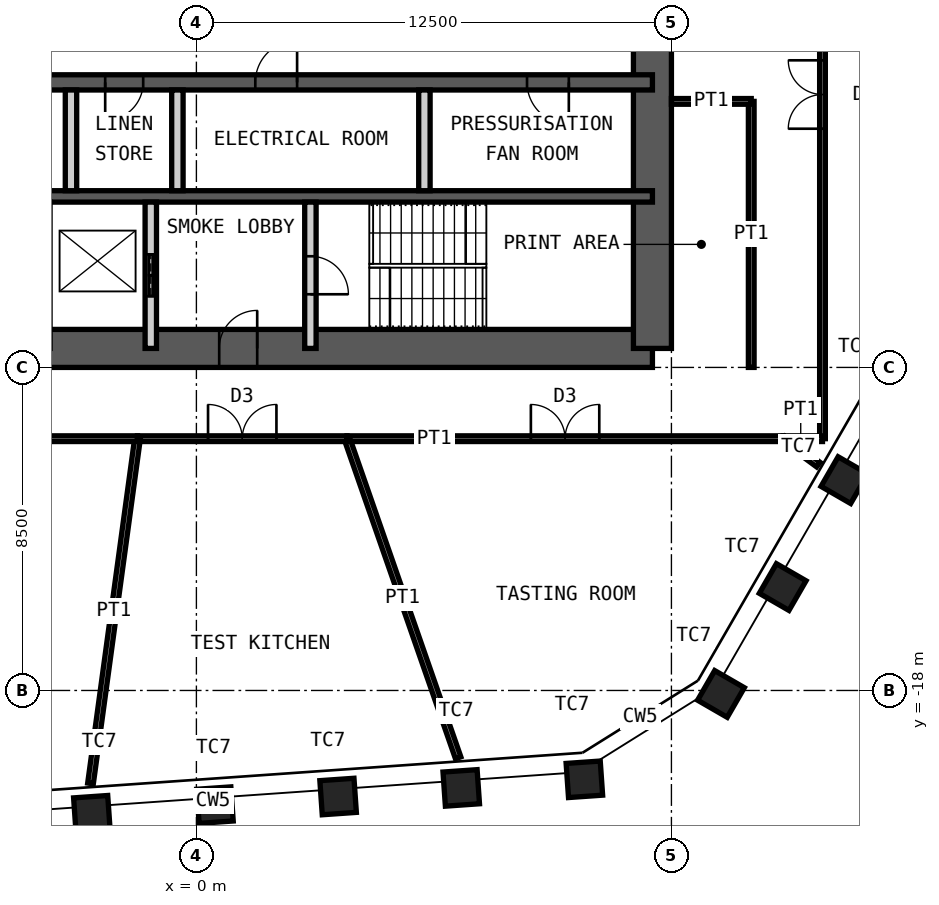
"""IFC4 building model, lengths in metres.
Left out: names, types, materials, properties, quantities, classifications, styles, units other than length and angle.
Written with IfcOpenShell. Run it as: python <this file> out.ifc"""

import sys

from ifc_helpers import new_model, si_unit, direction, frame, frame_2d, origin, origin_2d, place, context, subcontext, project, spatial, rectangle, hollow_rectangle, extrude, element, fill, save


model = new_model("IFC4")
c1 = context("Model", 3, precision=1e-05, world=origin(), true_north=direction((0.0, 1.0)))
c2 = subcontext(c1, "Body", "Model", "MODEL_VIEW")
j1 = project(units=[si_unit("LENGTHUNIT", "METRE"), si_unit("PLANEANGLEUNIT", "RADIAN")], contexts=[c1])
p1 = place(None, origin())
s1 = spatial("IfcSite", under=j1, at=p1, CompositionType="ELEMENT")
p2 = place(p1, origin())
s2 = spatial("IfcBuilding", under=s1, at=p2, CompositionType="ELEMENT")
p3 = place(p2, frame((0.0, 0.0, 287.2)))
s3 = spatial("IfcBuildingStorey", under=s2, at=p3, CompositionType="ELEMENT", Elevation=287.2)
for number, where, z_axis, x_axis in (
    (1, (17.052, -12.466, 0.0), (0.0, 0.0, 1.0), (0.5, 0.866, 0.0)),
    (2, (15.427, -15.279, 0.0), (0.0, 0.0, 1.0), (0.5, 0.866, 0.0)),
    (3, (13.803, -18.092, 0.0), (0.0, 0.0, 1.0), (0.5, 0.866, 0.0)),
    (4, (10.209, -20.337, 0.0), (0.0, 0.0, 1.0), (0.998, 0.07, 0.0)),
    (5, (6.969, -20.564, 0.0), (0.0, 0.0, 1.0), (0.998, 0.07, 0.0)),
    (6, (3.729, -20.791, 0.0), (0.0, 0.0, 1.0), (0.998, 0.07, 0.0)),
    (7, (0.489, -21.017, 0.0), (0.0, 0.0, 1.0), (0.998, 0.07, 0.0)),
    (8, (-2.751, -21.244, 0.0), (0.0, 0.0, 1.0), (0.998, 0.07, 0.0)),
):
    element("IfcColumn", number, at=place(p3, frame(where, z_axis=z_axis, x_axis=x_axis)), inside=s3, PredefinedType="COLUMN", context=c2, shape_type="SweptSolid", body=[
        extrude(hollow_rectangle(XDim=0.9, YDim=0.9, WallThickness=0.06, at=origin_2d()), origin(), (0.0, 0.0, 1.0), 4.2),
    ])
p4 = place(p3, frame((-12.0, -9.0, 0.0), z_axis=(0.0, 0.0, 1.0), x_axis=(1.0, 0.0, 0.0)))
e9 = element("IfcWall", 9, at=p4, inside=s3, PredefinedType="SHEAR", context=c2, shape_type="SweptSolid", body=[
    extrude(rectangle(XDim=24.0, YDim=1.0, at=frame_2d((12.0, 0.0))), origin(), (0.0, 0.0, 1.0), 4.2),
])
p5 = place(p4, frame((1.35, 0.0, 0.0)))
e10 = element("IfcOpeningElement", 10, at=p5, cuts=e9, PredefinedType="OPENING", context=c2, shape_type="SweptSolid", body=[
    extrude(rectangle(XDim=1.0, YDim=2.1, at=frame_2d((0.5, 1.05))), frame((0.0, 0.51, 0.0), z_axis=(0.0, -1.0, 0.0), x_axis=(1.0, 0.0, 0.0)), (0.0, 0.0, 1.0), 1.02),
])
p6 = place(p4, frame((5.325, 0.0, 0.0)))
e11 = element("IfcOpeningElement", 11, at=p6, cuts=e9, PredefinedType="OPENING", context=c2, shape_type="SweptSolid", body=[
    extrude(rectangle(XDim=1.15, YDim=2.1, at=frame_2d((0.575, 1.05))), frame((0.0, 0.51, 0.0), z_axis=(0.0, -1.0, 0.0), x_axis=(1.0, 0.0, 0.0)), (0.0, 0.0, 1.0), 1.02),
])
p7 = place(p4, frame((12.6, 0.0, 0.0)))
e12 = element("IfcOpeningElement", 12, at=p7, cuts=e9, PredefinedType="OPENING", context=c2, shape_type="SweptSolid", body=[
    extrude(rectangle(XDim=1.0, YDim=2.1, at=frame_2d((0.5, 1.05))), frame((0.0, 0.51, 0.0), z_axis=(0.0, -1.0, 0.0), x_axis=(1.0, 0.0, 0.0)), (0.0, 0.0, 1.0), 1.02),
])
p8 = place(p3, frame((12.0, -9.0, 0.0), z_axis=(0.0, 0.0, 1.0), x_axis=(0.0, 1.0, 0.0)))
e13 = element("IfcWall", 13, at=p8, inside=s3, PredefinedType="SHEAR", context=c2, shape_type="SweptSolid", body=[
    extrude(rectangle(XDim=18.0, YDim=1.0, at=frame_2d((9.0, 0.0))), origin(), (0.0, 0.0, 1.0), 4.2),
])
p9 = place(p8, frame((8.1, 0.0, 0.0)))
e14 = element("IfcOpeningElement", 14, at=p9, cuts=e13, PredefinedType="OPENING", context=c2, shape_type="SweptSolid", body=[
    extrude(rectangle(XDim=1.8, YDim=2.1, at=frame_2d((0.9, 1.05))), frame((0.0, 0.51, 0.0), z_axis=(0.0, -1.0, 0.0), x_axis=(1.0, 0.0, 0.0)), (0.0, 0.0, 1.0), 1.02),
])
p10 = place(p3, frame((-12.0, -2.0, 0.0), z_axis=(0.0, 0.0, 1.0), x_axis=(1.0, 0.0, 0.0)))
e15 = element("IfcWall", 15, at=p10, inside=s3, PredefinedType="SHEAR", context=c2, shape_type="SweptSolid", body=[
    extrude(rectangle(XDim=24.0, YDim=0.4, at=frame_2d((12.0, 0.0))), origin(), (0.0, 0.0, 1.0), 4.2),
])
p11 = place(p10, frame((1.1, 0.0, 0.0)))
e16 = element("IfcOpeningElement", 16, at=p11, cuts=e15, PredefinedType="OPENING", context=c2, shape_type="SweptSolid", body=[
    extrude(rectangle(XDim=1.1, YDim=2.1, at=frame_2d((0.55, 1.05))), frame((0.0, 0.21, 0.0), z_axis=(0.0, -1.0, 0.0), x_axis=(1.0, 0.0, 0.0)), (0.0, 0.0, 1.0), 0.42),
])
p12 = place(p10, frame((13.55, 0.0, 0.0)))
e17 = element("IfcOpeningElement", 17, at=p12, cuts=e15, PredefinedType="OPENING", context=c2, shape_type="SweptSolid", body=[
    extrude(rectangle(XDim=1.1, YDim=2.1, at=frame_2d((0.55, 1.05))), frame((0.0, 0.21, 0.0), z_axis=(0.0, -1.0, 0.0), x_axis=(1.0, 0.0, 0.0)), (0.0, 0.0, 1.0), 0.42),
])
p13 = place(p10, frame((20.7, 0.0, 0.0)))
e18 = element("IfcOpeningElement", 18, at=p13, cuts=e15, PredefinedType="OPENING", context=c2, shape_type="SweptSolid", body=[
    extrude(rectangle(XDim=1.1, YDim=2.1, at=frame_2d((0.55, 1.05))), frame((0.0, 0.21, 0.0), z_axis=(0.0, -1.0, 0.0), x_axis=(1.0, 0.0, 0.0)), (0.0, 0.0, 1.0), 0.42),
])
p14 = place(p10, frame((4.0, 0.0, 0.0)))
e19 = element("IfcOpeningElement", 19, at=p14, cuts=e15, PredefinedType="OPENING", context=c2, shape_type="SweptSolid", body=[
    extrude(rectangle(XDim=1.0, YDim=2.1, at=frame_2d((0.5, 1.05))), frame((0.0, 0.21, 0.0), z_axis=(0.0, -1.0, 0.0), x_axis=(1.0, 0.0, 0.0)), (0.0, 0.0, 1.0), 0.42),
])
p15 = place(p10, frame((6.8, 0.0, 0.0)))
e20 = element("IfcOpeningElement", 20, at=p15, cuts=e15, PredefinedType="OPENING", context=c2, shape_type="SweptSolid", body=[
    extrude(rectangle(XDim=1.0, YDim=2.1, at=frame_2d((0.5, 1.05))), frame((0.0, 0.21, 0.0), z_axis=(0.0, -1.0, 0.0), x_axis=(1.0, 0.0, 0.0)), (0.0, 0.0, 1.0), 0.42),
])
p16 = place(p10, frame((9.6, 0.0, 0.0)))
e21 = element("IfcOpeningElement", 21, at=p16, cuts=e15, PredefinedType="OPENING", context=c2, shape_type="SweptSolid", body=[
    extrude(rectangle(XDim=1.0, YDim=2.1, at=frame_2d((0.5, 1.05))), frame((0.0, 0.21, 0.0), z_axis=(0.0, -1.0, 0.0), x_axis=(1.0, 0.0, 0.0)), (0.0, 0.0, 1.0), 0.42),
])
p17 = place(p3, frame((-12.0, -5.0, 0.0), z_axis=(0.0, 0.0, 1.0), x_axis=(1.0, 0.0, 0.0)))
e22 = element("IfcWall", 22, at=p17, inside=s3, PredefinedType="SHEAR", context=c2, shape_type="SweptSolid", body=[
    extrude(rectangle(XDim=24.0, YDim=0.3, at=frame_2d((12.0, 0.0))), origin(), (0.0, 0.0, 1.0), 4.2),
])
for number, where, z_axis, x_axis in (
    (23, (-3.3, -4.85, 0.0), (0.0, 0.0, 1.0), (0.0, 1.0, 0.0)),
    (24, (-0.5, -4.85, 0.0), (0.0, 0.0, 1.0), (0.0, 1.0, 0.0)),
    (25, (6.0, -4.85, 0.0), (0.0, 0.0, 1.0), (0.0, 1.0, 0.0)),
):
    element("IfcWall", number, at=place(p3, frame(where, z_axis=z_axis, x_axis=x_axis)), inside=s3, PredefinedType="PARTITIONING", context=c2, shape_type="SweptSolid", body=[
        extrude(rectangle(XDim=2.65, YDim=0.3, at=frame_2d((1.325, 0.0))), origin(), (0.0, 0.0, 1.0), 3.98),
    ])
p18 = place(p3, frame((-1.2, -9.0, 0.0), z_axis=(0.0, 0.0, 1.0), x_axis=(0.0, 1.0, 0.0)))
e26 = element("IfcWall", 26, at=p18, inside=s3, PredefinedType="PARTITIONING", context=c2, shape_type="SweptSolid", body=[
    extrude(rectangle(XDim=3.85, YDim=0.3, at=frame_2d((1.925, 0.0))), origin(), (0.0, 0.0, 1.0), 3.98),
])
p19 = place(p18, frame((1.375, 0.0, 0.0)))
e27 = element("IfcOpeningElement", 27, at=p19, cuts=e26, PredefinedType="OPENING", context=c2, shape_type="SweptSolid", body=[
    extrude(rectangle(XDim=1.1, YDim=2.4, at=frame_2d((0.55, 1.2))), frame((0.0, 0.16, 0.0), z_axis=(0.0, -1.0, 0.0), x_axis=(1.0, 0.0, 0.0)), (0.0, 0.0, 1.0), 0.32),
])
p20 = place(p3, frame((3.0, -9.0, 0.0), z_axis=(0.0, 0.0, 1.0), x_axis=(0.0, 1.0, 0.0)))
e28 = element("IfcWall", 28, at=p20, inside=s3, PredefinedType="PARTITIONING", context=c2, shape_type="SweptSolid", body=[
    extrude(rectangle(XDim=3.85, YDim=0.3, at=frame_2d((1.925, 0.0))), origin(), (0.0, 0.0, 1.0), 3.98),
])
p21 = place(p20, frame((1.425, 0.0, 0.0)))
e29 = element("IfcOpeningElement", 29, at=p21, cuts=e28, PredefinedType="OPENING", context=c2, shape_type="SweptSolid", body=[
    extrude(rectangle(XDim=1.0, YDim=2.1, at=frame_2d((0.5, 1.05))), frame((0.0, 0.16, 0.0), z_axis=(0.0, -1.0, 0.0), x_axis=(1.0, 0.0, 0.0)), (0.0, 0.0, 1.0), 0.32),
])
p22 = place(p3, frame((16.475, 6.737, 0.0), z_axis=(0.0, 0.0, 1.0), x_axis=(0.0, -1.0, 0.0)))
e30 = element("IfcWall", 30, at=p22, inside=s3, PredefinedType="PARTITIONING", context=c2, shape_type="SweptSolid", body=[
    extrude(rectangle(XDim=18.112, YDim=0.15, at=frame_2d((9.056, 0.0))), origin(), (0.0, 0.0, 1.0), 4.03),
])
p23 = place(p22, frame((8.156, 0.0, 0.0)))
e31 = element("IfcOpeningElement", 31, at=p23, cuts=e30, PredefinedType="OPENING", context=c2, shape_type="SweptSolid", body=[
    extrude(rectangle(XDim=1.8, YDim=2.4, at=frame_2d((0.9, 1.2))), frame((0.0, 0.085, 0.0), z_axis=(0.0, -1.0, 0.0), x_axis=(1.0, 0.0, 0.0)), (0.0, 0.0, 1.0), 0.17),
])
p24 = place(p3, frame((16.475, -11.375, 0.0), z_axis=(0.0, 0.0, 1.0), x_axis=(-1.0, 0.0, 0.0)))
e32 = element("IfcWall", 32, at=p24, inside=s3, PredefinedType="PARTITIONING", context=c2, shape_type="SweptSolid", body=[
    extrude(rectangle(XDim=1.035, YDim=0.15, at=frame_2d((0.518, 0.0))), origin(), (0.0, 0.0, 1.0), 4.03),
])
p25 = place(p3, frame((16.365, -12.056, 0.0), z_axis=(0.0, 0.0, 1.0), x_axis=(-0.805146625055, 0.593075806421, 0.0)))
e33 = element("IfcWall", 33, at=p25, inside=s3, PredefinedType="PARTITIONING", context=c2, shape_type="SweptSolid", body=[
    extrude(rectangle(XDim=1.149, YDim=0.15, at=frame_2d((0.574, 0.0))), origin(), (0.0, 0.0, 1.0), 3.33),
])
p26 = place(p3, frame((15.44, -11.375, 0.0), z_axis=(0.0, 0.0, 1.0), x_axis=(-1.0, 0.0, 0.0)))
e34 = element("IfcWall", 34, at=p26, inside=s3, PredefinedType="PARTITIONING", context=c2, shape_type="SweptSolid", body=[
    extrude(rectangle(XDim=11.477, YDim=0.15, at=frame_2d((5.739, 0.0))), origin(), (0.0, 0.0, 1.0), 4.03),
])
p27 = place(p26, frame((4.839, 0.0, 0.0)))
e35 = element("IfcOpeningElement", 35, at=p27, cuts=e34, PredefinedType="OPENING", context=c2, shape_type="SweptSolid", body=[
    extrude(rectangle(XDim=1.8, YDim=2.4, at=frame_2d((0.9, 1.2))), frame((0.0, 0.085, 0.0), z_axis=(0.0, -1.0, 0.0), x_axis=(1.0, 0.0, 0.0)), (0.0, 0.0, 1.0), 0.17),
])
p28 = place(p3, frame((6.888, -19.771, 0.0), z_axis=(0.0, 0.0, 1.0), x_axis=(-0.328983865825, 0.944335542075, 0.0)))
e36 = element("IfcWall", 36, at=p28, inside=s3, PredefinedType="PARTITIONING", context=c2, shape_type="SweptSolid", body=[
    extrude(rectangle(XDim=8.891, YDim=0.15, at=frame_2d((4.446, 0.0))), origin(), (0.0, 0.0, 1.0), 3.33),
])
p29 = place(p3, frame((3.963, -11.375, 0.0), z_axis=(0.0, 0.0, 1.0), x_axis=(-1.0, 0.0, 0.0)))
e37 = element("IfcWall", 37, at=p29, inside=s3, PredefinedType="PARTITIONING", context=c2, shape_type="SweptSolid", body=[
    extrude(rectangle(XDim=5.513, YDim=0.15, at=frame_2d((2.756, 0.0))), origin(), (0.0, 0.0, 1.0), 4.03),
])
p30 = place(p29, frame((1.856, 0.0, 0.0)))
e38 = element("IfcOpeningElement", 38, at=p30, cuts=e37, PredefinedType="OPENING", context=c2, shape_type="SweptSolid", body=[
    extrude(rectangle(XDim=1.8, YDim=2.4, at=frame_2d((0.9, 1.2))), frame((0.0, 0.085, 0.0), z_axis=(0.0, -1.0, 0.0), x_axis=(1.0, 0.0, 0.0)), (0.0, 0.0, 1.0), 0.17),
])
p31 = place(p3, frame((-2.786, -20.446, 0.0), z_axis=(0.0, 0.0, 1.0), x_axis=(0.135041803834, 0.99083990191, 0.0)))
e39 = element("IfcWall", 39, at=p31, inside=s3, PredefinedType="PARTITIONING", context=c2, shape_type="SweptSolid", body=[
    extrude(rectangle(XDim=9.155, YDim=0.15, at=frame_2d((4.578, 0.0))), origin(), (0.0, 0.0, 1.0), 3.33),
])
p32 = place(p3, frame((-1.55, -11.375, 0.0), z_axis=(0.0, 0.0, 1.0), x_axis=(-1.0, 0.0, 0.0)))
e40 = element("IfcWall", 40, at=p32, inside=s3, PredefinedType="PARTITIONING", context=c2, shape_type="SweptSolid", body=[
    extrude(rectangle(XDim=11.19, YDim=0.15, at=frame_2d((5.595, 0.0))), origin(), (0.0, 0.0, 1.0), 4.03),
])
p33 = place(p32, frame((4.695, 0.0, 0.0)))
e41 = element("IfcOpeningElement", 41, at=p33, cuts=e40, PredefinedType="OPENING", context=c2, shape_type="SweptSolid", body=[
    extrude(rectangle(XDim=1.8, YDim=2.4, at=frame_2d((0.9, 1.2))), frame((0.0, 0.085, 0.0), z_axis=(0.0, -1.0, 0.0), x_axis=(1.0, 0.0, 0.0)), (0.0, 0.0, 1.0), 0.17),
])
p34 = place(p3, frame((14.6, -9.5, 0.0), z_axis=(0.0, 0.0, 1.0), x_axis=(0.0, 1.0, 0.0)))
e42 = element("IfcWall", 42, at=p34, inside=s3, PredefinedType="PARTITIONING", context=c2, shape_type="SweptSolid", body=[
    extrude(rectangle(XDim=7.0, YDim=0.15, at=frame_2d((3.5, 0.0))), origin(), (0.0, 0.0, 1.0), 4.03),
])
p35 = place(p3, frame((12.5, -2.5, 0.0), z_axis=(0.0, 0.0, 1.0), x_axis=(1.0, 0.0, 0.0)))
e43 = element("IfcWall", 43, at=p35, inside=s3, PredefinedType="PARTITIONING", context=c2, shape_type="SweptSolid", body=[
    extrude(rectangle(XDim=2.1, YDim=0.15, at=frame_2d((1.05, 0.0))), origin(), (0.0, 0.0, 1.0), 3.33),
])
p36 = place(p7, origin())
e44 = element("IfcDoor", 44, at=p36, inside=s3, OperationType="SINGLE_SWING_LEFT", PredefinedType="DOOR", context=c2, shape_type="SweptSolid", body=[
    extrude(rectangle(XDim=1.0, YDim=2.1, at=frame_2d((0.5, 1.05))), frame((0.0, 0.025, 0.0), z_axis=(0.0, -1.0, 0.0), x_axis=(1.0, 0.0, 0.0)), (0.0, 0.0, 1.0), 0.05),
])
fill(e12, e44)
p37 = place(p21, origin())
e45 = element("IfcDoor", 45, at=p37, inside=s3, OperationType="SINGLE_SWING_LEFT", PredefinedType="DOOR", context=c2, shape_type="SweptSolid", body=[
    extrude(rectangle(XDim=1.0, YDim=2.1, at=frame_2d((0.5, 1.05))), frame((0.0, 0.025, 0.0), z_axis=(0.0, -1.0, 0.0), x_axis=(1.0, 0.0, 0.0)), (0.0, 0.0, 1.0), 0.05),
])
fill(e29, e45)
p38 = place(p12, origin())
e46 = element("IfcDoor", 46, at=p38, inside=s3, OperationType="SINGLE_SWING_LEFT", PredefinedType="DOOR", context=c2, shape_type="SweptSolid", body=[
    extrude(rectangle(XDim=1.1, YDim=2.1, at=frame_2d((0.55, 1.05))), frame((0.0, 0.025, 0.0), z_axis=(0.0, -1.0, 0.0), x_axis=(1.0, 0.0, 0.0)), (0.0, 0.0, 1.0), 0.05),
])
fill(e17, e46)
p39 = place(p13, origin())
e47 = element("IfcDoor", 47, at=p39, inside=s3, OperationType="SINGLE_SWING_RIGHT", PredefinedType="DOOR", context=c2, shape_type="SweptSolid", body=[
    extrude(rectangle(XDim=1.1, YDim=2.1, at=frame_2d((0.55, 1.05))), frame((0.0, 0.025, 0.0), z_axis=(0.0, -1.0, 0.0), x_axis=(1.0, 0.0, 0.0)), (0.0, 0.0, 1.0), 0.05),
])
fill(e18, e47)
p40 = place(p19, origin())
e48 = element("IfcDoor", 48, at=p40, inside=s3, OperationType="DOUBLE_DOOR_SLIDING", PredefinedType="DOOR", context=c2, shape_type="SweptSolid", body=[
    extrude(rectangle(XDim=1.1, YDim=2.4, at=frame_2d((0.55, 1.2))), frame((0.0, 0.025, 0.0), z_axis=(0.0, -1.0, 0.0), x_axis=(1.0, 0.0, 0.0)), (0.0, 0.0, 1.0), 0.05),
])
fill(e27, e48)
p41 = place(p16, origin())
e49 = element("IfcDoor", 49, at=p41, inside=s3, OperationType="SINGLE_SWING_LEFT", PredefinedType="DOOR", context=c2, shape_type="SweptSolid", body=[
    extrude(rectangle(XDim=1.0, YDim=2.1, at=frame_2d((0.5, 1.05))), frame((0.0, 0.025, 0.0), z_axis=(0.0, -1.0, 0.0), x_axis=(1.0, 0.0, 0.0)), (0.0, 0.0, 1.0), 0.05),
])
fill(e21, e49)
p42 = place(p23, origin())
e50 = element("IfcDoor", 50, at=p42, inside=s3, OperationType="DOUBLE_DOOR_DOUBLE_SWING", PredefinedType="DOOR", context=c2, shape_type="SweptSolid", body=[
    extrude(rectangle(XDim=1.8, YDim=2.4, at=frame_2d((0.9, 1.2))), frame((0.0, 0.025, 0.0), z_axis=(0.0, -1.0, 0.0), x_axis=(1.0, 0.0, 0.0)), (0.0, 0.0, 1.0), 0.05),
])
fill(e31, e50)
p43 = place(p27, origin())
e51 = element("IfcDoor", 51, at=p43, inside=s3, OperationType="DOUBLE_DOOR_DOUBLE_SWING", PredefinedType="DOOR", context=c2, shape_type="SweptSolid", body=[
    extrude(rectangle(XDim=1.8, YDim=2.4, at=frame_2d((0.9, 1.2))), frame((0.0, 0.025, 0.0), z_axis=(0.0, -1.0, 0.0), x_axis=(1.0, 0.0, 0.0)), (0.0, 0.0, 1.0), 0.05),
])
fill(e35, e51)
p44 = place(p30, origin())
e52 = element("IfcDoor", 52, at=p44, inside=s3, OperationType="DOUBLE_DOOR_DOUBLE_SWING", PredefinedType="DOOR", context=c2, shape_type="SweptSolid", body=[
    extrude(rectangle(XDim=1.8, YDim=2.4, at=frame_2d((0.9, 1.2))), frame((0.0, 0.025, 0.0), z_axis=(0.0, -1.0, 0.0), x_axis=(1.0, 0.0, 0.0)), (0.0, 0.0, 1.0), 0.05),
])
fill(e38, e52)
save(model, sys.argv[1])
